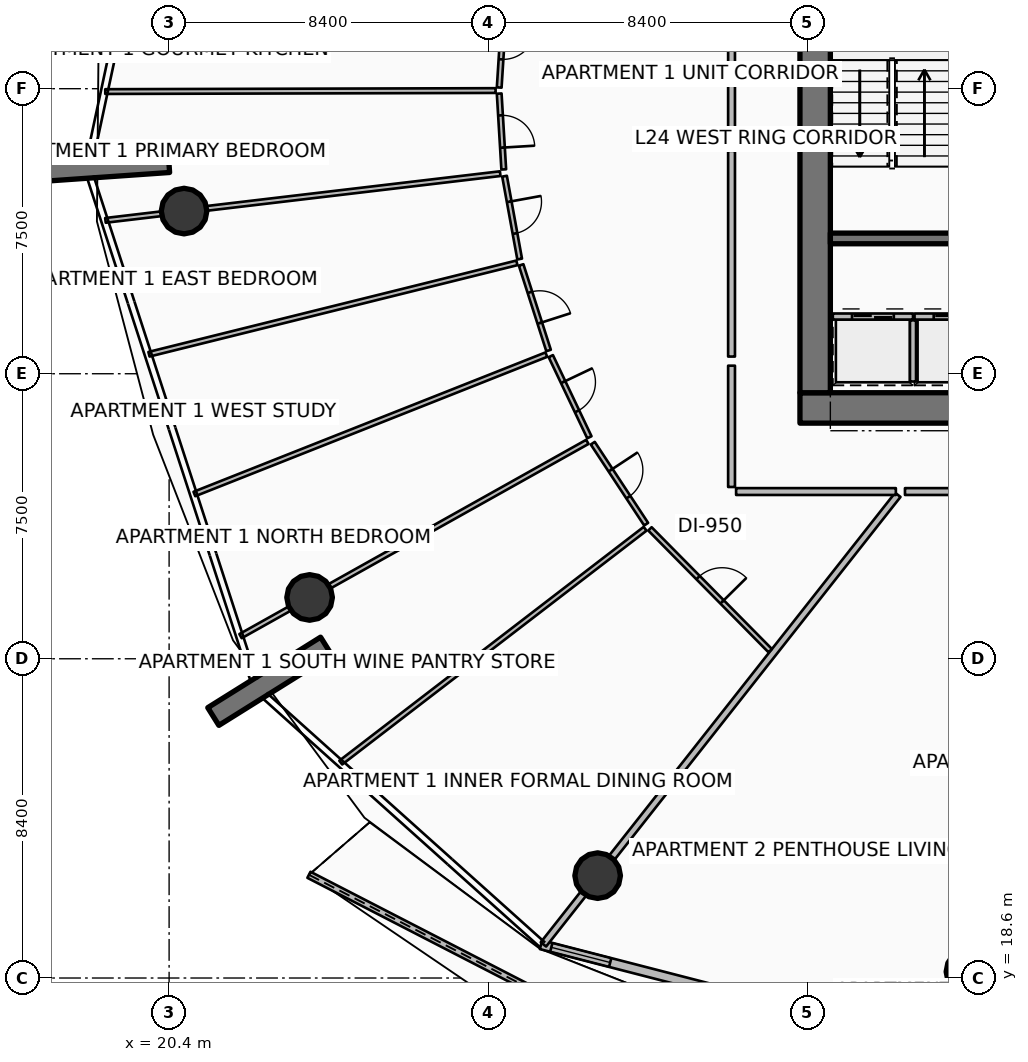
"""IFC4 building model, lengths in metres.
Left out: names, types, materials, properties, quantities, classifications, styles, units other than length and angle.
Written with IfcOpenShell. Run it as: python <this file> out.ifc"""

import sys

from ifc_helpers import new_model, si_unit, direction, frame, frame_2d, origin, origin_2d, place, context, subcontext, project, spatial, polyline, rectangle, circle, outline, extrude, element, fill, save


model = new_model("IFC4")
c1 = context("Model", 3, precision=1e-05, world=origin(), true_north=direction((0.0, 1.0)))
c2 = subcontext(c1, "Body", "Model", "MODEL_VIEW")
j1 = project(units=[si_unit("LENGTHUNIT", "METRE"), si_unit("PLANEANGLEUNIT", "RADIAN")], contexts=[c1])
p1 = place(None, origin())
s1 = spatial("IfcSite", under=j1, at=p1, CompositionType="ELEMENT")
p2 = place(p1, origin())
s2 = spatial("IfcBuilding", under=s1, at=p2, CompositionType="ELEMENT")
p3 = place(p2, frame((0.0, 0.0, 97.65)))
s3 = spatial("IfcBuildingStorey", under=s2, at=p3, CompositionType="ELEMENT", Elevation=97.65)
p4 = place(p3, frame((37.0, 33.6, 0.0), z_axis=(0.0, 0.0, 1.0), x_axis=(1.0, 0.0, 0.0)))
e1 = element("IfcWall", 1, at=p4, inside=s3, PredefinedType="SHEAR", context=c2, shape_type="SweptSolid", body=[
    extrude(rectangle(XDim=9.9, YDim=0.8, at=frame_2d((4.95, 0.0))), origin(), (0.0, 0.0, 1.0), 3.75),
])
p5 = place(p3, frame((37.4, 34.0, 0.0), z_axis=(0.0, 0.0, 1.0), x_axis=(0.0, 1.0, 0.0)))
e2 = element("IfcWall", 2, at=p5, inside=s3, PredefinedType="SHEAR", context=c2, shape_type="SweptSolid", body=[
    extrude(rectangle(XDim=16.0, YDim=0.8, at=frame_2d((8.0, 0.0))), origin(), (0.0, 0.0, 1.0), 3.75),
])
p6 = place(p3, frame((37.8, 38.06, 0.0), z_axis=(0.0, 0.0, 1.0), x_axis=(1.0, 0.0, 0.0)))
e3 = element("IfcWall", 3, at=p6, inside=s3, PredefinedType="SHEAR", context=c2, shape_type="SweptSolid", body=[
    extrude(rectangle(XDim=3.5, YDim=0.28, at=frame_2d((1.75, 0.0))), origin(), (0.0, 0.0, 1.0), 3.75),
])
for number, where, z_axis, x_axis in (
    (4, (20.394, 40.07, 0.0), (0.0, 0.0, 1.0), (-0.998, -0.07, 0.0)),
    (5, (24.531, 27.335, 0.0), (0.0, 0.0, 1.0), (-0.848, -0.53, 0.0)),
):
    element("IfcWall", number, at=place(p3, frame(where, z_axis=z_axis, x_axis=x_axis)), inside=s3, PredefinedType="SOLIDWALL", context=c2, shape_type="SweptSolid", body=[
        extrude(rectangle(XDim=3.5, YDim=0.55, at=frame_2d((1.75, 0.0))), origin(), (0.0, 0.0, 1.0), 3.75),
    ])
for number, where, z_axis, x_axis in (
    (6, (20.793, 38.78, 0.0), (0.0, 0.0, 1.0), (1.0, 0.0, 0.0)),
    (7, (24.097, 28.614, 0.0), (0.0, 0.0, 1.0), (1.0, 0.0, 0.0)),
    (8, (31.677, 21.294, 0.0), (0.0, 0.0, 1.0), (1.0, 0.0, 0.0)),
    (9, (41.447, 18.766, 0.0), (0.0, 0.0, 1.0), (1.0, 0.0, 0.0)),
):
    element("IfcColumn", number, at=place(p3, frame(where, z_axis=z_axis, x_axis=x_axis)), inside=s3, PredefinedType="COLUMN", context=c2, shape_type="SweptSolid", body=[
        extrude(circle(Radius=0.6, at=origin_2d()), origin(), (0.0, 0.0, 1.0), 3.5),
    ])
p7 = place(p3, frame((24.08, 21.316, 0.0), z_axis=(0.0, 0.0, 1.0), x_axis=(0.888984508261, -0.457937270892, 0.0)))
e10 = element("IfcWall", 10, at=p7, inside=s3, PredefinedType="PARAPET", context=c2, shape_type="SweptSolid", body=[
    extrude(outline(polyline([(0.0, 0.0), (11.803, 0.0), (11.803, 1.148), (5.902, 1.284), (0.0, 1.483), (0.0, 0.0)])), frame((0.0, 0.09, 0.0), z_axis=(0.0, -1.0, 0.0), x_axis=(1.0, 0.0, 0.0)), (0.0, 0.0, 1.0), 0.18),
])
p8 = place(p3, frame((30.186, 19.477, 0.0), z_axis=(0.0, 0.0, 1.0), x_axis=(0.968356180858, -0.249572248045, 0.0)))
e11 = element("IfcWall", 11, at=p8, inside=s3, PredefinedType="SOLIDWALL", context=c2, shape_type="SweptSolid", body=[
    extrude(rectangle(XDim=11.084, YDim=0.24, at=frame_2d((5.542, 0.0))), origin(), (0.0, 0.0, 1.0), 2.45),
])
p9 = place(p8, frame((8.865, 0.0, 0.0)))
e12 = element("IfcOpeningElement", 12, at=p9, cuts=e11, PredefinedType="OPENING", context=c2, shape_type="SweptSolid", body=[
    extrude(rectangle(XDim=1.45, YDim=2.15, at=frame_2d((0.725, 1.075))), frame((0.0, 0.13, 0.0), z_axis=(0.0, -1.0, 0.0), x_axis=(1.0, 0.0, 0.0)), (0.0, 0.0, 1.0), 0.26),
])
p10 = place(p8, frame((0.28, 0.0, 0.65)))
e13 = element("IfcOpeningElement", 13, at=p10, cuts=e11, PredefinedType="OPENING", context=c2, shape_type="SweptSolid", body=[
    extrude(rectangle(XDim=1.6, YDim=1.5, at=frame_2d((0.8, 0.75))), frame((0.0, 0.13, 0.0), z_axis=(0.0, -1.0, 0.0), x_axis=(1.0, 0.0, 0.0)), (0.0, 0.0, 1.0), 0.26),
])
p11 = place(p3, frame((37.865, 36.005, 0.0), z_axis=(0.0, 0.0, 1.0), x_axis=(1.0, 0.0, 0.0)))
e14 = element("IfcWall", 14, at=p11, inside=s3, PredefinedType="PARTITIONING", context=c2, shape_type="SweptSolid", body=[
    extrude(rectangle(XDim=2.11, YDim=0.16, at=frame_2d((1.055, 0.0))), origin(), (0.0, 0.0, 1.0), 3.5),
])
p12 = place(p11, frame((0.505, 0.0, 0.0)))
e15 = element("IfcOpeningElement", 15, at=p12, cuts=e14, PredefinedType="OPENING", context=c2, shape_type="SweptSolid", body=[
    extrude(rectangle(XDim=1.1, YDim=2.1, at=frame_2d((0.55, 1.05))), frame((0.0, 0.09, 0.0), z_axis=(0.0, -1.0, 0.0), x_axis=(1.0, 0.0, 0.0)), (0.0, 0.0, 1.0), 0.18),
])
p13 = place(p3, frame((39.975, 34.295, 0.0), z_axis=(0.0, 0.0, 1.0), x_axis=(0.0, 1.0, 0.0)))
e16 = element("IfcWall", 16, at=p13, inside=s3, PredefinedType="PARTITIONING", context=c2, shape_type="SweptSolid", body=[
    extrude(rectangle(XDim=1.61, YDim=0.16, at=frame_2d((0.805, 0.0))), origin(), (0.0, 0.0, 1.0), 3.5),
])
p14 = place(p3, frame((40.015, 36.005, 0.0), z_axis=(0.0, 0.0, 1.0), x_axis=(1.0, 0.0, 0.0)))
e17 = element("IfcWall", 17, at=p14, inside=s3, PredefinedType="PARTITIONING", context=c2, shape_type="SweptSolid", body=[
    extrude(rectangle(XDim=2.11, YDim=0.16, at=frame_2d((1.055, 0.0))), origin(), (0.0, 0.0, 1.0), 3.5),
])
p15 = place(p14, frame((0.505, 0.0, 0.0)))
e18 = element("IfcOpeningElement", 18, at=p15, cuts=e17, PredefinedType="OPENING", context=c2, shape_type="SweptSolid", body=[
    extrude(rectangle(XDim=1.1, YDim=2.1, at=frame_2d((0.55, 1.05))), frame((0.0, 0.09, 0.0), z_axis=(0.0, -1.0, 0.0), x_axis=(1.0, 0.0, 0.0)), (0.0, 0.0, 1.0), 0.18),
])
p16 = place(p3, frame((39.575, 31.314, 0.0), z_axis=(0.0, 0.0, 1.0), x_axis=(-0.619083417853, -0.785325233098, 0.0)))
e19 = element("IfcWall", 19, at=p16, inside=s3, PredefinedType="PARTITIONING", context=c2, shape_type="SweptSolid", body=[
    extrude(rectangle(XDim=15.063, YDim=0.18, at=frame_2d((7.532, 0.0))), origin(), (0.0, 0.0, 1.0), 2.94),
])
p17 = place(p3, frame((35.2, 45.49, 0.0), z_axis=(0.0, 0.0, 1.0), x_axis=(0.0, -1.0, 0.0)))
e20 = element("IfcWall", 20, at=p17, inside=s3, PredefinedType="PARTITIONING", context=c2, shape_type="SweptSolid", body=[
    extrude(rectangle(XDim=4.885, YDim=0.18, at=frame_2d((2.442, 0.0))), origin(), (0.0, 0.0, 1.0), 2.94),
])
p18 = place(p3, frame((28.991, 41.951, 0.0), z_axis=(0.0, 0.0, 1.0), x_axis=(-0.999996643903, -0.002590788034, 0.0)))
e21 = element("IfcWall", 21, at=p18, inside=s3, PredefinedType="PARTITIONING", context=c2, shape_type="SweptSolid", body=[
    extrude(rectangle(XDim=10.271, YDim=0.125, at=frame_2d((5.136, 0.0))), origin(), (0.0, 0.0, 1.0), 2.94),
])
p19 = place(p3, frame((29.235, 44.362, 0.0), z_axis=(0.0, 0.0, 1.0), x_axis=(-0.063647003528, -0.99797247404, 0.0)))
e22 = element("IfcWall", 22, at=p19, inside=s3, PredefinedType="PARTITIONING", context=c2, shape_type="SweptSolid", body=[
    extrude(rectangle(XDim=2.336, YDim=0.125, at=frame_2d((1.168, 0.0))), origin(), (0.0, 0.0, 1.0), 2.94),
])
p20 = place(p19, frame((0.743, 0.0, 0.0)))
e23 = element("IfcOpeningElement", 23, at=p20, cuts=e22, PredefinedType="OPENING", context=c2, shape_type="SweptSolid", body=[
    extrude(rectangle(XDim=0.85, YDim=2.06, at=frame_2d((0.425, 1.03))), frame((0.0, 0.073, 0.0), z_axis=(0.0, -1.0, 0.0), x_axis=(1.0, 0.0, 0.0)), (0.0, 0.0, 1.0), 0.145),
])
p21 = place(p3, frame((29.086, 41.871, 0.0), z_axis=(0.0, 0.0, 1.0), x_axis=(0.060104090143, -0.99819211495, 0.0)))
e24 = element("IfcWall", 24, at=p21, inside=s3, PredefinedType="PARTITIONING", context=c2, shape_type="SweptSolid", body=[
    extrude(rectangle(XDim=1.999, YDim=0.125, at=frame_2d((0.999, 0.0))), origin(), (0.0, 0.0, 1.0), 2.94),
])
p22 = place(p21, frame((0.574, 0.0, 0.0)))
e25 = element("IfcOpeningElement", 25, at=p22, cuts=e24, PredefinedType="OPENING", context=c2, shape_type="SweptSolid", body=[
    extrude(rectangle(XDim=0.85, YDim=2.06, at=frame_2d((0.425, 1.03))), frame((0.0, 0.073, 0.0), z_axis=(0.0, -1.0, 0.0), x_axis=(1.0, 0.0, 0.0)), (0.0, 0.0, 1.0), 0.145),
])
p23 = place(p3, frame((35.2, 40.365, 0.0), z_axis=(0.0, 0.0, 1.0), x_axis=(0.0, -1.0, 0.0)))
e26 = element("IfcWall", 26, at=p23, inside=s3, PredefinedType="PARTITIONING", context=c2, shape_type="SweptSolid", body=[
    extrude(rectangle(XDim=5.413, YDim=0.18, at=frame_2d((2.707, 0.0))), origin(), (0.0, 0.0, 1.0), 2.94),
])
p24 = place(p3, frame((29.113, 39.764, 0.0), z_axis=(0.0, 0.0, 1.0), x_axis=(-0.993070875002, -0.117516965677, 0.0)))
e27 = element("IfcWall", 27, at=p24, inside=s3, PredefinedType="PARTITIONING", context=c2, shape_type="SweptSolid", body=[
    extrude(rectangle(XDim=10.46, YDim=0.125, at=frame_2d((5.23, 0.0))), origin(), (0.0, 0.0, 1.0), 2.94),
])
p25 = place(p3, frame((29.552, 37.417, 0.0), z_axis=(0.0, 0.0, 1.0), x_axis=(-0.970504192203, -0.241084244437, 0.0)))
e28 = element("IfcWall", 28, at=p25, inside=s3, PredefinedType="PARTITIONING", context=c2, shape_type="SweptSolid", body=[
    extrude(rectangle(XDim=9.976, YDim=0.125, at=frame_2d((4.988, 0.0))), origin(), (0.0, 0.0, 1.0), 2.94),
])
p26 = place(p3, frame((30.326, 35.002, 0.0), z_axis=(0.0, 0.0, 1.0), x_axis=(-0.929777602375, -0.368121732748, 0.0)))
e29 = element("IfcWall", 29, at=p26, inside=s3, PredefinedType="PARTITIONING", context=c2, shape_type="SweptSolid", body=[
    extrude(rectangle(XDim=9.961, YDim=0.125, at=frame_2d((4.98, 0.0))), origin(), (0.0, 0.0, 1.0), 2.94),
])
p27 = place(p3, frame((29.227, 39.698, 0.0), z_axis=(0.0, 0.0, 1.0), x_axis=(0.179602920825, -0.983739188419, 0.0)))
e30 = element("IfcWall", 30, at=p27, inside=s3, PredefinedType="PARTITIONING", context=c2, shape_type="SweptSolid", body=[
    extrude(rectangle(XDim=2.216, YDim=0.125, at=frame_2d((1.108, 0.0))), origin(), (0.0, 0.0, 1.0), 2.94),
])
p28 = place(p27, frame((0.683, 0.0, 0.0)))
e31 = element("IfcOpeningElement", 31, at=p28, cuts=e30, PredefinedType="OPENING", context=c2, shape_type="SweptSolid", body=[
    extrude(rectangle(XDim=0.85, YDim=2.06, at=frame_2d((0.425, 1.03))), frame((0.0, 0.073, 0.0), z_axis=(0.0, -1.0, 0.0), x_axis=(1.0, 0.0, 0.0)), (0.0, 0.0, 1.0), 0.145),
])
p29 = place(p3, frame((29.663, 37.363, 0.0), z_axis=(0.0, 0.0, 1.0), x_axis=(0.305393983716, -0.952226083822, 0.0)))
e32 = element("IfcWall", 32, at=p29, inside=s3, PredefinedType="PARTITIONING", context=c2, shape_type="SweptSolid", body=[
    extrude(rectangle(XDim=2.364, YDim=0.125, at=frame_2d((1.182, 0.0))), origin(), (0.0, 0.0, 1.0), 2.94),
])
p30 = place(p29, frame((0.757, 0.0, 0.0)))
e33 = element("IfcOpeningElement", 33, at=p30, cuts=e32, PredefinedType="OPENING", context=c2, shape_type="SweptSolid", body=[
    extrude(rectangle(XDim=0.85, YDim=2.06, at=frame_2d((0.425, 1.03))), frame((0.0, 0.073, 0.0), z_axis=(0.0, -1.0, 0.0), x_axis=(1.0, 0.0, 0.0)), (0.0, 0.0, 1.0), 0.145),
])
p31 = place(p3, frame((30.444, 34.963, 0.0), z_axis=(0.0, 0.0, 1.0), x_axis=(0.429404357622, -0.903112339443, 0.0)))
e34 = element("IfcWall", 34, at=p31, inside=s3, PredefinedType="PARTITIONING", context=c2, shape_type="SweptSolid", body=[
    extrude(rectangle(XDim=2.364, YDim=0.125, at=frame_2d((1.182, 0.0))), origin(), (0.0, 0.0, 1.0), 2.94),
])
p32 = place(p31, frame((0.757, 0.0, 0.0)))
e35 = element("IfcOpeningElement", 35, at=p32, cuts=e34, PredefinedType="OPENING", context=c2, shape_type="SweptSolid", body=[
    extrude(rectangle(XDim=0.85, YDim=2.06, at=frame_2d((0.425, 1.03))), frame((0.0, 0.073, 0.0), z_axis=(0.0, -1.0, 0.0), x_axis=(1.0, 0.0, 0.0)), (0.0, 0.0, 1.0), 0.145),
])
p33 = place(p3, frame((35.2, 34.712, 0.0), z_axis=(0.0, 0.0, 1.0), x_axis=(0.0, -1.0, 0.0)))
e36 = element("IfcWall", 36, at=p33, inside=s3, PredefinedType="PARTITIONING", context=c2, shape_type="SweptSolid", body=[
    extrude(rectangle(XDim=3.192, YDim=0.18, at=frame_2d((1.596, 0.0))), origin(), (0.0, 0.0, 1.0), 2.94),
])
p34 = place(p3, frame((35.32, 31.4, 0.0), z_axis=(0.0, 0.0, 1.0), x_axis=(1.0, 0.0, 0.0)))
e37 = element("IfcWall", 37, at=p34, inside=s3, PredefinedType="PARTITIONING", context=c2, shape_type="SweptSolid", body=[
    extrude(rectangle(XDim=4.204, YDim=0.18, at=frame_2d((2.102, 0.0))), origin(), (0.0, 0.0, 1.0), 2.94),
])
p35 = place(p3, frame((31.406, 32.707, 0.0), z_axis=(0.0, 0.0, 1.0), x_axis=(-0.872500841978, -0.488612608052, 0.0)))
e38 = element("IfcWall", 38, at=p35, inside=s3, PredefinedType="PARTITIONING", context=c2, shape_type="SweptSolid", body=[
    extrude(rectangle(XDim=10.46, YDim=0.125, at=frame_2d((5.23, 0.0))), origin(), (0.0, 0.0, 1.0), 2.94),
])
p36 = place(p3, frame((32.925, 30.42, 0.0), z_axis=(0.0, 0.0, 1.0), x_axis=(-0.793033627653, -0.609177860244, 0.0)))
e39 = element("IfcWall", 39, at=p36, inside=s3, PredefinedType="PARTITIONING", context=c2, shape_type="SweptSolid", body=[
    extrude(rectangle(XDim=10.099, YDim=0.125, at=frame_2d((5.049, 0.0))), origin(), (0.0, 0.0, 1.0), 2.94),
])
p37 = place(p3, frame((31.548, 32.672, 0.0), z_axis=(0.0, 0.0, 1.0), x_axis=(0.550387635728, -0.834909246827, 0.0)))
e40 = element("IfcWall", 40, at=p37, inside=s3, PredefinedType="PARTITIONING", context=c2, shape_type="SweptSolid", body=[
    extrude(rectangle(XDim=2.552, YDim=0.125, at=frame_2d((1.276, 0.0))), origin(), (0.0, 0.0, 1.0), 2.94),
])
p38 = place(p37, frame((0.851, 0.0, 0.0)))
e41 = element("IfcOpeningElement", 41, at=p38, cuts=e40, PredefinedType="OPENING", context=c2, shape_type="SweptSolid", body=[
    extrude(rectangle(XDim=0.85, YDim=2.06, at=frame_2d((0.425, 1.03))), frame((0.0, 0.073, 0.0), z_axis=(0.0, -1.0, 0.0), x_axis=(1.0, 0.0, 0.0)), (0.0, 0.0, 1.0), 0.145),
])
p39 = place(p3, frame((33.053, 30.418, 0.0), z_axis=(0.0, 0.0, 1.0), x_axis=(0.702647387595, -0.711538227157, 0.0)))
e42 = element("IfcWall", 42, at=p39, inside=s3, PredefinedType="PARTITIONING", context=c2, shape_type="SweptSolid", body=[
    extrude(rectangle(XDim=4.503, YDim=0.125, at=frame_2d((2.252, 0.0))), origin(), (0.0, 0.0, 1.0), 2.94),
])
p40 = place(p39, frame((1.802, 0.0, 0.0)))
e43 = element("IfcOpeningElement", 43, at=p40, cuts=e42, PredefinedType="OPENING", context=c2, shape_type="SweptSolid", body=[
    extrude(rectangle(XDim=0.9, YDim=2.08, at=frame_2d((0.45, 1.04))), frame((0.0, 0.073, 0.0), z_axis=(0.0, -1.0, 0.0), x_axis=(1.0, 0.0, 0.0)), (0.0, 0.0, 1.0), 0.145),
])
p41 = place(p3, frame((39.764, 31.4, 0.0), z_axis=(0.0, 0.0, 1.0), x_axis=(1.0, 0.0, 0.0)))
e44 = element("IfcWall", 44, at=p41, inside=s3, PredefinedType="PARTITIONING", context=c2, shape_type="SweptSolid", body=[
    extrude(rectangle(XDim=5.127, YDim=0.18, at=frame_2d((2.563, 0.0))), origin(), (0.0, 0.0, 1.0), 2.94),
])
p42 = place(p41, frame((2.013, 0.0, 0.0)))
e45 = element("IfcOpeningElement", 45, at=p42, cuts=e44, PredefinedType="OPENING", context=c2, shape_type="SweptSolid", body=[
    extrude(rectangle(XDim=1.1, YDim=2.1, at=frame_2d((0.55, 1.05))), frame((0.0, 0.1, 0.0), z_axis=(0.0, -1.0, 0.0), x_axis=(1.0, 0.0, 0.0)), (0.0, 0.0, 1.0), 0.2),
])
p43 = place(p3, frame((43.747, 26.92, 0.0), z_axis=(0.0, 0.0, 1.0), x_axis=(-0.271445765154, -0.962453737371, 0.0)))
e46 = element("IfcWall", 46, at=p43, inside=s3, PredefinedType="PARTITIONING", context=c2, shape_type="SweptSolid", body=[
    extrude(rectangle(XDim=10.47, YDim=0.125, at=frame_2d((5.235, 0.0))), origin(), (0.0, 0.0, 1.0), 2.94),
])
p44 = place(p10, origin())
e47 = element("IfcWindow", 47, at=p44, inside=s3, PartitioningType="SINGLE_PANEL", PredefinedType="WINDOW", context=c2, shape_type="SweptSolid", body=[
    extrude(rectangle(XDim=1.6, YDim=1.5, at=frame_2d((0.8, 0.75))), frame((0.0, 0.03, 0.0), z_axis=(0.0, -1.0, 0.0), x_axis=(1.0, 0.0, 0.0)), (0.0, 0.0, 1.0), 0.06),
])
fill(e13, e47)
p45 = place(p12, origin())
e48 = element("IfcDoor", 48, at=p45, inside=s3, OperationType="DOUBLE_DOOR_SLIDING", PredefinedType="DOOR", context=c2, shape_type="SweptSolid", body=[
    extrude(rectangle(XDim=1.1, YDim=2.1, at=frame_2d((0.55, 1.05))), frame((0.0, 0.025, 0.0), z_axis=(0.0, -1.0, 0.0), x_axis=(1.0, 0.0, 0.0)), (0.0, 0.0, 1.0), 0.05),
])
fill(e15, e48)
p46 = place(p15, origin())
e49 = element("IfcDoor", 49, at=p46, inside=s3, OperationType="DOUBLE_DOOR_SLIDING", PredefinedType="DOOR", context=c2, shape_type="SweptSolid", body=[
    extrude(rectangle(XDim=1.1, YDim=2.1, at=frame_2d((0.55, 1.05))), frame((0.0, 0.025, 0.0), z_axis=(0.0, -1.0, 0.0), x_axis=(1.0, 0.0, 0.0)), (0.0, 0.0, 1.0), 0.05),
])
fill(e18, e49)
p47 = place(p20, origin())
e50 = element("IfcDoor", 50, at=p47, inside=s3, OperationType="SINGLE_SWING_LEFT", PredefinedType="DOOR", context=c2, shape_type="SweptSolid", body=[
    extrude(rectangle(XDim=0.85, YDim=2.06, at=frame_2d((0.425, 1.03))), frame((0.0, 0.025, 0.0), z_axis=(0.0, -1.0, 0.0), x_axis=(1.0, 0.0, 0.0)), (0.0, 0.0, 1.0), 0.05),
])
fill(e23, e50)
p48 = place(p22, origin())
e51 = element("IfcDoor", 51, at=p48, inside=s3, OperationType="SINGLE_SWING_RIGHT", PredefinedType="DOOR", context=c2, shape_type="SweptSolid", body=[
    extrude(rectangle(XDim=0.85, YDim=2.06, at=frame_2d((0.425, 1.03))), frame((0.0, 0.025, 0.0), z_axis=(0.0, -1.0, 0.0), x_axis=(1.0, 0.0, 0.0)), (0.0, 0.0, 1.0), 0.05),
])
fill(e25, e51)
p49 = place(p28, origin())
e52 = element("IfcDoor", 52, at=p49, inside=s3, OperationType="SINGLE_SWING_LEFT", PredefinedType="DOOR", context=c2, shape_type="SweptSolid", body=[
    extrude(rectangle(XDim=0.85, YDim=2.06, at=frame_2d((0.425, 1.03))), frame((0.0, 0.025, 0.0), z_axis=(0.0, -1.0, 0.0), x_axis=(1.0, 0.0, 0.0)), (0.0, 0.0, 1.0), 0.05),
])
fill(e31, e52)
p50 = place(p30, origin())
e53 = element("IfcDoor", 53, at=p50, inside=s3, OperationType="SINGLE_SWING_RIGHT", PredefinedType="DOOR", context=c2, shape_type="SweptSolid", body=[
    extrude(rectangle(XDim=0.85, YDim=2.06, at=frame_2d((0.425, 1.03))), frame((0.0, 0.025, 0.0), z_axis=(0.0, -1.0, 0.0), x_axis=(1.0, 0.0, 0.0)), (0.0, 0.0, 1.0), 0.05),
])
fill(e33, e53)
p51 = place(p32, origin())
e54 = element("IfcDoor", 54, at=p51, inside=s3, OperationType="SINGLE_SWING_LEFT", PredefinedType="DOOR", context=c2, shape_type="SweptSolid", body=[
    extrude(rectangle(XDim=0.85, YDim=2.06, at=frame_2d((0.425, 1.03))), frame((0.0, 0.025, 0.0), z_axis=(0.0, -1.0, 0.0), x_axis=(1.0, 0.0, 0.0)), (0.0, 0.0, 1.0), 0.05),
])
fill(e35, e54)
p52 = place(p38, origin())
e55 = element("IfcDoor", 55, at=p52, inside=s3, OperationType="SINGLE_SWING_LEFT", PredefinedType="DOOR", context=c2, shape_type="SweptSolid", body=[
    extrude(rectangle(XDim=0.85, YDim=2.06, at=frame_2d((0.425, 1.03))), frame((0.0, 0.025, 0.0), z_axis=(0.0, -1.0, 0.0), x_axis=(1.0, 0.0, 0.0)), (0.0, 0.0, 1.0), 0.05),
])
fill(e41, e55)
p53 = place(p40, origin())
e56 = element("IfcDoor", 56, at=p53, inside=s3, OperationType="SINGLE_SWING_RIGHT", PredefinedType="DOOR", context=c2, shape_type="SweptSolid", body=[
    extrude(rectangle(XDim=0.9, YDim=2.08, at=frame_2d((0.45, 1.04))), frame((0.0, 0.025, 0.0), z_axis=(0.0, -1.0, 0.0), x_axis=(1.0, 0.0, 0.0)), (0.0, 0.0, 1.0), 0.05),
])
fill(e43, e56)
save(model, sys.argv[1])
